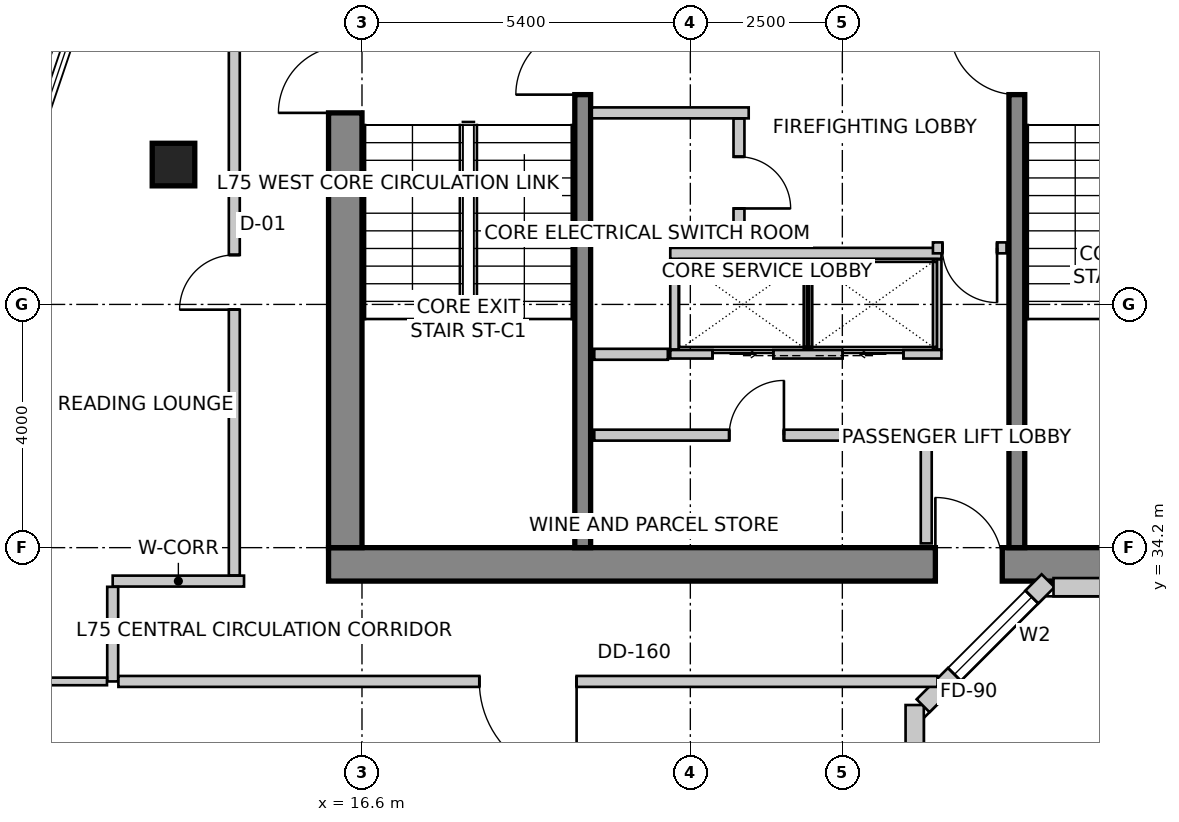
"""IFC4 building model, lengths in metres.
Left out: names, types, materials, properties, quantities, classifications, styles, units other than length and angle.
Written with IfcOpenShell. Run it as: python <this file> out.ifc"""

import sys

from ifc_helpers import new_model, si_unit, direction, frame, frame_2d, origin, origin_2d, place, context, subcontext, project, spatial, rectangle, extrude, source, transform, mapped, element, fill, save


model = new_model("IFC4")
c1 = context("Model", 3, precision=1e-05, world=origin(), true_north=direction((0.0, 1.0)))
c2 = subcontext(c1, "Body", "Model", "MODEL_VIEW")
j1 = project(units=[si_unit("LENGTHUNIT", "METRE"), si_unit("PLANEANGLEUNIT", "RADIAN")], contexts=[c1])
p1 = place(None, origin())
s1 = spatial("IfcSite", under=j1, at=p1, CompositionType="ELEMENT")
p2 = place(p1, origin())
s2 = spatial("IfcBuilding", under=s1, at=p2, CompositionType="ELEMENT")
p3 = place(p2, frame((0.0, 0.0, 292.5)))
s3 = spatial("IfcBuildingStorey", under=s2, at=p3, CompositionType="ELEMENT", Elevation=292.5)
p4 = place(p3, frame((16.05, 33.925, 0.0), z_axis=(0.0, 0.0, 1.0), x_axis=(1.0, 0.0, 0.0)))
e1 = element("IfcWall", 1, at=p4, inside=s3, PredefinedType="SHEAR", context=c2, shape_type="SweptSolid", body=[
    extrude(rectangle(XDim=15.5, YDim=0.55, at=frame_2d((7.75, 0.0))), origin(), (0.0, 0.0, 1.0), 4.0),
])
m1 = source(origin(), c2, "Body", "SweptSolid", [
    extrude(rectangle(XDim=1.1, YDim=2.15, at=frame_2d((0.55, 1.075))), frame((0.0, 0.285, 0.0), z_axis=(0.0, -1.0, 0.0), x_axis=(1.0, 0.0, 0.0)), (0.0, 0.0, 1.0), 0.57),
])
p5 = place(p4, frame((9.98, 0.0, 0.0)))
e2 = element("IfcOpeningElement", 2, at=p5, cuts=e1, PredefinedType="OPENING", context=c2, shape_type="MappedRepresentation", body=[
    mapped(m1, transform((0.0, 0.0, 0.0), scale=1.0)),
])
p6 = place(p3, frame((16.325, 34.2, 0.0), z_axis=(0.0, 0.0, 1.0), x_axis=(0.0, 1.0, 0.0)))
e3 = element("IfcWall", 3, at=p6, inside=s3, PredefinedType="SHEAR", context=c2, shape_type="SweptSolid", body=[
    extrude(rectangle(XDim=11.4, YDim=0.55, at=frame_2d((5.7, 0.0))), origin(), (0.0, 0.0, 1.0), 4.0),
])
p7 = place(p6, frame((7.15, 0.0, 0.0)))
e4 = element("IfcOpeningElement", 4, at=p7, cuts=e3, PredefinedType="OPENING", context=c2, shape_type="MappedRepresentation", body=[
    mapped(m1, transform((0.0, 0.0, 0.0), scale=1.0)),
])
p8 = place(p3, frame((20.23, 34.2, 0.0), z_axis=(0.0, 0.0, 1.0), x_axis=(0.0, 1.0, 0.0)))
e5 = element("IfcWall", 5, at=p8, inside=s3, PredefinedType="SHEAR", context=c2, shape_type="SweptSolid", body=[
    extrude(rectangle(XDim=9.06, YDim=0.26, at=frame_2d((4.53, 0.0))), origin(), (0.0, 0.0, 1.0), 4.0),
])
m2 = source(origin(), c2, "Body", "SweptSolid", [
    extrude(rectangle(XDim=1.1, YDim=2.15, at=frame_2d((0.55, 1.075))), frame((0.0, 0.14, 0.0), z_axis=(0.0, -1.0, 0.0), x_axis=(1.0, 0.0, 0.0)), (0.0, 0.0, 1.0), 0.28),
])
p9 = place(p8, frame((7.45, 0.0, 0.0)))
e6 = element("IfcOpeningElement", 6, at=p9, cuts=e5, PredefinedType="OPENING", context=c2, shape_type="MappedRepresentation", body=[
    mapped(m2, transform((0.0, 0.0, 0.0), scale=1.0)),
])
p10 = place(p3, frame((27.37, 34.2, 0.0), z_axis=(0.0, 0.0, 1.0), x_axis=(0.0, 1.0, 0.0)))
e7 = element("IfcWall", 7, at=p10, inside=s3, PredefinedType="SHEAR", context=c2, shape_type="SweptSolid", body=[
    extrude(rectangle(XDim=9.06, YDim=0.26, at=frame_2d((4.53, 0.0))), origin(), (0.0, 0.0, 1.0), 4.0),
])
p11 = place(p10, frame((7.45, 0.0, 0.0)))
e8 = element("IfcOpeningElement", 8, at=p11, cuts=e7, PredefinedType="OPENING", context=c2, shape_type="MappedRepresentation", body=[
    mapped(m2, transform((0.0, 0.0, 0.0), scale=1.0)),
])
m3 = source(origin(), c2, "Body", "SweptSolid", [
    extrude(rectangle(XDim=0.7, YDim=0.7, at=origin_2d()), origin(), (0.0, 0.0, 1.0), 4.0),
])
p12 = place(p3, frame((13.5, 40.5, 0.0), z_axis=(0.0, 0.0, 1.0), x_axis=(1.0, 0.0, 0.0)))
e9 = element("IfcColumn", 9, at=p12, inside=s3, PredefinedType="COLUMN", context=c2, shape_type="MappedRepresentation", body=[
    mapped(m3, transform((0.0, 0.0, 0.0), scale=1.0)),
])
p13 = place(p3, frame((25.69, 24.957, 0.0), z_axis=(0.0, 0.0, 1.0), x_axis=(0.0, 1.0, 0.0)))
e10 = element("IfcWall", 10, at=p13, inside=s3, PredefinedType="SOLIDWALL", context=c2, shape_type="SweptSolid", body=[
    extrude(rectangle(XDim=6.655, YDim=0.3, at=frame_2d((3.327, 0.0))), origin(), (0.0, 0.0, 1.0), 3.75),
])
m4 = source(origin(), c2, "Body", "SweptSolid", [
    extrude(rectangle(XDim=1.5, YDim=1.8, at=frame_2d((0.75, 0.9))), frame((0.0, 0.16, 0.0), z_axis=(0.0, -1.0, 0.0), x_axis=(1.0, 0.0, 0.0)), (0.0, 0.0, 1.0), 0.32),
])
p14 = place(p13, frame((0.604, 0.0, 0.85)))
e11 = element("IfcOpeningElement", 11, at=p14, cuts=e10, PredefinedType="OPENING", context=c2, shape_type="MappedRepresentation", body=[
    mapped(m4, transform((0.0, 0.0, 0.0), scale=1.0)),
])
m5 = source(origin(), c2, "Body", "SweptSolid", [
    extrude(rectangle(XDim=2.4, YDim=2.2, at=frame_2d((1.2, 1.1))), frame((0.0, 0.16, 0.0), z_axis=(0.0, -1.0, 0.0), x_axis=(1.0, 0.0, 0.0)), (0.0, 0.0, 1.0), 0.32),
])
p15 = place(p13, frame((3.381, 0.0, 0.85)))
e12 = element("IfcOpeningElement", 12, at=p15, cuts=e10, PredefinedType="OPENING", context=c2, shape_type="MappedRepresentation", body=[
    mapped(m5, transform((0.0, 0.0, 0.0), scale=1.0)),
])
p16 = place(p3, frame((25.828, 31.6, 0.0), z_axis=(0.0, 0.0, 1.0), x_axis=(0.707106781187, 0.707106781187, 0.0)))
e13 = element("IfcWall", 13, at=p16, inside=s3, PredefinedType="SOLIDWALL", context=c2, shape_type="SweptSolid", body=[
    extrude(rectangle(XDim=2.907, YDim=0.3, at=frame_2d((1.454, 0.0))), origin(), (0.0, 0.0, 1.0), 3.75),
])
m6 = source(origin(), c2, "Body", "SweptSolid", [
    extrude(rectangle(XDim=1.8, YDim=2.1, at=frame_2d((0.9, 1.05))), frame((0.0, 0.16, 0.0), z_axis=(0.0, -1.0, 0.0), x_axis=(1.0, 0.0, 0.0)), (0.0, 0.0, 1.0), 0.32),
])
p17 = place(p16, frame((0.729, 0.0, 0.85)))
e14 = element("IfcOpeningElement", 14, at=p17, cuts=e13, PredefinedType="OPENING", context=c2, shape_type="MappedRepresentation", body=[
    mapped(m6, transform((0.0, 0.0, 0.0), scale=1.0)),
])
p18 = place(p3, frame((27.973, 33.55, 0.0), z_axis=(0.0, 0.0, 1.0), x_axis=(1.0, 0.0, 0.0)))
e15 = element("IfcWall", 15, at=p18, inside=s3, PredefinedType="SOLIDWALL", context=c2, shape_type="SweptSolid", body=[
    extrude(rectangle(XDim=9.115, YDim=0.3, at=frame_2d((4.558, 0.0))), origin(), (0.0, 0.0, 1.0), 3.75),
])
p19 = place(p18, frame((1.239, 0.0, 0.85)))
e16 = element("IfcOpeningElement", 16, at=p19, cuts=e15, PredefinedType="OPENING", context=c2, shape_type="MappedRepresentation", body=[
    mapped(m5, transform((0.0, 0.0, 0.0), scale=1.0)),
])
m7 = source(origin(), c2, "Body", "SweptSolid", [
    extrude(rectangle(XDim=2.8, YDim=2.4, at=frame_2d((1.4, 1.2))), frame((0.0, 0.16, 0.0), z_axis=(0.0, -1.0, 0.0), x_axis=(1.0, 0.0, 0.0)), (0.0, 0.0, 1.0), 0.32),
])
p20 = place(p18, frame((5.276, 0.0, 0.85)))
e17 = element("IfcOpeningElement", 17, at=p20, cuts=e15, PredefinedType="OPENING", context=c2, shape_type="MappedRepresentation", body=[
    mapped(m7, transform((0.0, 0.0, 0.0), scale=1.0)),
])
p21 = place(p3, frame((21.67, 37.38, 0.0), z_axis=(0.0, 0.0, 1.0), x_axis=(1.0, 0.0, 0.0)))
e18 = element("IfcWall", 18, at=p21, inside=s3, PredefinedType="SOLIDWALL", context=c2, shape_type="SweptSolid", body=[
    extrude(rectangle(XDim=4.46, YDim=0.14, at=frame_2d((2.23, 0.0))), origin(), (0.0, 0.0, 1.0), 3.75),
])
m8 = source(origin(), c2, "Body", "SweptSolid", [
    extrude(rectangle(XDim=1.0, YDim=2.15, at=frame_2d((0.5, 1.075))), frame((0.0, 0.08, 0.0), z_axis=(0.0, -1.0, 0.0), x_axis=(1.0, 0.0, 0.0)), (0.0, 0.0, 1.0), 0.16),
])
p22 = place(p21, frame((0.695, 0.0, 0.0)))
e19 = element("IfcOpeningElement", 19, at=p22, cuts=e18, PredefinedType="OPENING", context=c2, shape_type="MappedRepresentation", body=[
    mapped(m8, transform((0.0, 0.0, 0.0), scale=1.0)),
])
p23 = place(p21, frame((2.835, 0.0, 0.0)))
e20 = element("IfcOpeningElement", 20, at=p23, cuts=e18, PredefinedType="OPENING", context=c2, shape_type="MappedRepresentation", body=[
    mapped(m8, transform((0.0, 0.0, 0.0), scale=1.0)),
])
p24 = place(p3, frame((21.67, 39.04, 0.0), z_axis=(0.0, 0.0, 1.0), x_axis=(1.0, 0.0, 0.0)))
e21 = element("IfcWall", 21, at=p24, inside=s3, PredefinedType="SOLIDWALL", context=c2, shape_type="SweptSolid", body=[
    extrude(rectangle(XDim=4.46, YDim=0.18, at=frame_2d((2.23, 0.0))), origin(), (0.0, 0.0, 1.0), 3.75),
])
for number, where, z_axis, x_axis in (
    (22, (26.06, 37.46, 0.0), (0.0, 0.0, 1.0), (0.0, 1.0, 0.0)),
    (23, (21.74, 37.46, 0.0), (0.0, 0.0, 1.0), (0.0, 1.0, 0.0)),
    (24, (23.935, 37.46, 0.0), (0.0, 0.0, 1.0), (0.0, 1.0, 0.0)),
):
    element("IfcWall", number, at=place(p3, frame(where, z_axis=z_axis, x_axis=x_axis)), inside=s3, PredefinedType="SOLIDWALL", context=c2, shape_type="SweptSolid", body=[
        extrude(rectangle(XDim=1.48, YDim=0.14, at=frame_2d((0.74, 0.0))), origin(), (0.0, 0.0, 1.0), 3.75),
    ])
p25 = place(p3, frame((22.96, 41.35, 0.0), z_axis=(0.0, 0.0, 1.0), x_axis=(-1.0, 0.0, 0.0)))
e25 = element("IfcWall", 25, at=p25, inside=s3, PredefinedType="PARTITIONING", context=c2, shape_type="SweptSolid", body=[
    extrude(rectangle(XDim=2.58, YDim=0.18, at=frame_2d((1.29, 0.0))), origin(), (0.0, 0.0, 1.0), 3.75),
])
p26 = place(p3, frame((22.8, 41.256, 0.0), z_axis=(0.0, 0.0, 1.0), x_axis=(0.0, -1.0, 0.0)))
e26 = element("IfcWall", 26, at=p26, inside=s3, PredefinedType="PARTITIONING", context=c2, shape_type="SweptSolid", body=[
    extrude(rectangle(XDim=2.106, YDim=0.18, at=frame_2d((1.053, 0.0))), origin(), (0.0, 0.0, 1.0), 3.75),
])
m9 = source(origin(), c2, "Body", "SweptSolid", [
    extrude(rectangle(XDim=0.85, YDim=2.15, at=frame_2d((0.425, 1.075))), frame((0.0, 0.1, 0.0), z_axis=(0.0, -1.0, 0.0), x_axis=(1.0, 0.0, 0.0)), (0.0, 0.0, 1.0), 0.2),
])
p27 = place(p26, frame((0.628, 0.0, 0.0)))
e27 = element("IfcOpeningElement", 27, at=p27, cuts=e26, PredefinedType="OPENING", context=c2, shape_type="MappedRepresentation", body=[
    mapped(m9, transform((0.0, 0.0, 0.0), scale=1.0)),
])
p28 = place(p3, frame((21.63, 37.38, 0.0), z_axis=(0.0, 0.0, 1.0), x_axis=(-1.0, 0.0, 0.0)))
e28 = element("IfcWall", 28, at=p28, inside=s3, PredefinedType="PARTITIONING", context=c2, shape_type="SweptSolid", body=[
    extrude(rectangle(XDim=1.21, YDim=0.18, at=frame_2d((0.605, 0.0))), origin(), (0.0, 0.0, 1.0), 3.75),
])
p29 = place(p3, frame((27.2, 39.13, 0.0), z_axis=(0.0, 0.0, 1.0), x_axis=(-1.0, 0.0, 0.0)))
e29 = element("IfcWall", 29, at=p29, inside=s3, PredefinedType="PARTITIONING", context=c2, shape_type="SweptSolid", body=[
    extrude(rectangle(XDim=1.21, YDim=0.18, at=frame_2d((0.605, 0.0))), origin(), (0.0, 0.0, 1.0), 3.75),
])
m10 = source(origin(), c2, "Body", "SweptSolid", [
    extrude(rectangle(XDim=0.9, YDim=2.15, at=frame_2d((0.45, 1.075))), frame((0.0, 0.1, 0.0), z_axis=(0.0, -1.0, 0.0), x_axis=(1.0, 0.0, 0.0)), (0.0, 0.0, 1.0), 0.2),
])
p30 = place(p29, frame((0.155, 0.0, 0.0)))
e30 = element("IfcOpeningElement", 30, at=p30, cuts=e29, PredefinedType="OPENING", context=c2, shape_type="MappedRepresentation", body=[
    mapped(m10, transform((0.0, 0.0, 0.0), scale=1.0)),
])
p31 = place(p3, frame((20.42, 36.05, 0.0), z_axis=(0.0, 0.0, 1.0), x_axis=(1.0, 0.0, 0.0)))
e31 = element("IfcWall", 31, at=p31, inside=s3, PredefinedType="PARTITIONING", context=c2, shape_type="SweptSolid", body=[
    extrude(rectangle(XDim=5.46, YDim=0.18, at=frame_2d((2.73, 0.0))), origin(), (0.0, 0.0, 1.0), 3.75),
])
p32 = place(p31, frame((2.219, 0.0, 0.0)))
e32 = element("IfcOpeningElement", 32, at=p32, cuts=e31, PredefinedType="OPENING", context=c2, shape_type="MappedRepresentation", body=[
    mapped(m10, transform((0.0, 0.0, 0.0), scale=1.0)),
])
p33 = place(p3, frame((25.88, 35.956, 0.0), z_axis=(0.0, 0.0, 1.0), x_axis=(0.0, -1.0, 0.0)))
e33 = element("IfcWall", 33, at=p33, inside=s3, PredefinedType="PARTITIONING", context=c2, shape_type="SweptSolid", body=[
    extrude(rectangle(XDim=1.686, YDim=0.18, at=frame_2d((0.843, 0.0))), origin(), (0.0, 0.0, 1.0), 3.042),
])
p34 = place(p3, frame((12.5, 33.65, 0.0), z_axis=(0.0, 0.0, 1.0), x_axis=(1.0, 0.0, 0.0)))
e34 = element("IfcWall", 34, at=p34, inside=s3, PredefinedType="PARTITIONING", context=c2, shape_type="SweptSolid", body=[
    extrude(rectangle(XDim=2.16, YDim=0.18, at=frame_2d((1.08, 0.0))), origin(), (0.0, 0.0, 1.0), 3.75),
])
p35 = place(p3, frame((12.5, 32.0, 0.0), z_axis=(0.0, 0.0, 1.0), x_axis=(0.0, 1.0, 0.0)))
e35 = element("IfcWall", 35, at=p35, inside=s3, PredefinedType="PARTITIONING", context=c2, shape_type="SweptSolid", body=[
    extrude(rectangle(XDim=1.556, YDim=0.18, at=frame_2d((0.778, 0.0))), origin(), (0.0, 0.0, 1.0), 3.335),
])
p36 = place(p3, frame((26.065, 32.0, 0.0), z_axis=(0.0, 0.0, 1.0), x_axis=(-1.0, 0.0, 0.0)))
e36 = element("IfcWall", 36, at=p36, inside=s3, PredefinedType="PARTITIONING", context=c2, shape_type="SweptSolid", body=[
    extrude(rectangle(XDim=13.471, YDim=0.18, at=frame_2d((6.736, 0.0))), origin(), (0.0, 0.0, 1.0), 3.335),
])
m11 = source(origin(), c2, "Body", "SweptSolid", [
    extrude(rectangle(XDim=1.6, YDim=2.15, at=frame_2d((0.8, 1.075))), frame((0.0, 0.1, 0.0), z_axis=(0.0, -1.0, 0.0), x_axis=(1.0, 0.0, 0.0)), (0.0, 0.0, 1.0), 0.2),
])
p37 = place(p36, frame((5.936, 0.0, 0.0)))
e37 = element("IfcOpeningElement", 37, at=p37, cuts=e36, PredefinedType="OPENING", context=c2, shape_type="MappedRepresentation", body=[
    mapped(m11, transform((0.0, 0.0, 0.0), scale=1.0)),
])
p38 = place(p3, frame((14.5, 33.744, 0.0), z_axis=(0.0, 0.0, 1.0), x_axis=(0.0, 1.0, 0.0)))
e38 = element("IfcWall", 38, at=p38, inside=s3, PredefinedType="PARTITIONING", context=c2, shape_type="SweptSolid", body=[
    extrude(rectangle(XDim=12.406, YDim=0.18, at=frame_2d((6.203, 0.0))), origin(), (0.0, 0.0, 1.0), 3.75),
])
p39 = place(p38, frame((4.37, 0.0, 0.0)))
e39 = element("IfcOpeningElement", 39, at=p39, cuts=e38, PredefinedType="OPENING", context=c2, shape_type="MappedRepresentation", body=[
    mapped(m10, transform((0.0, 0.0, 0.0), scale=1.0)),
])
p40 = place(p3, frame((12.406, 32.0, 0.0), z_axis=(0.0, 0.0, 1.0), x_axis=(-1.0, 0.0, 0.0)))
e40 = element("IfcWall", 40, at=p40, inside=s3, PredefinedType="PARTITIONING", context=c2, shape_type="SweptSolid", body=[
    extrude(rectangle(XDim=4.126, YDim=0.125, at=frame_2d((2.063, 0.0))), origin(), (0.0, 0.0, 1.0), 3.042),
])
m12 = source(origin(), c2, "Body", "SweptSolid", [
    extrude(rectangle(XDim=1.8, YDim=2.1, at=frame_2d((0.9, 1.05))), frame((0.0, -0.015, 0.0), z_axis=(0.0, -1.0, 0.0), x_axis=(1.0, 0.0, 0.0)), (0.0, 0.0, 1.0), 0.06),
])
p41 = place(p17, origin())
e41 = element("IfcWindow", 41, at=p41, inside=s3, PartitioningType="SINGLE_PANEL", PredefinedType="WINDOW", context=c2, shape_type="MappedRepresentation", body=[
    mapped(m12, transform((0.0, 0.0, 0.0), scale=1.0)),
])
fill(e14, e41)
m13 = source(origin(), c2, "Body", "SweptSolid", [
    extrude(rectangle(XDim=1.0, YDim=2.15, at=frame_2d((0.5, 1.075))), frame((0.0, 0.025, 0.0), z_axis=(0.0, -1.0, 0.0), x_axis=(1.0, 0.0, 0.0)), (0.0, 0.0, 1.0), 0.05),
])
p42 = place(p22, origin())
e42 = element("IfcDoor", 42, at=p42, inside=s3, OperationType="SLIDING_TO_RIGHT", PredefinedType="DOOR", context=c2, shape_type="MappedRepresentation", body=[
    mapped(m13, transform((0.0, 0.0, 0.0), scale=1.0)),
])
fill(e19, e42)
p43 = place(p23, origin())
e43 = element("IfcDoor", 43, at=p43, inside=s3, OperationType="SLIDING_TO_LEFT", PredefinedType="DOOR", context=c2, shape_type="MappedRepresentation", body=[
    mapped(m13, transform((0.0, 0.0, 0.0), scale=1.0)),
])
fill(e20, e43)
m14 = source(origin(), c2, "Body", "SweptSolid", [
    extrude(rectangle(XDim=1.1, YDim=2.15, at=frame_2d((0.55, 1.075))), frame((0.0, 0.025, 0.0), z_axis=(0.0, -1.0, 0.0), x_axis=(1.0, 0.0, 0.0)), (0.0, 0.0, 1.0), 0.05),
])
p44 = place(p9, origin())
e44 = element("IfcDoor", 44, at=p44, inside=s3, OperationType="SINGLE_SWING_LEFT", PredefinedType="DOOR", context=c2, shape_type="MappedRepresentation", body=[
    mapped(m14, transform((0.0, 0.0, 0.0), scale=1.0)),
])
fill(e6, e44)
p45 = place(p11, origin())
e45 = element("IfcDoor", 45, at=p45, inside=s3, OperationType="SINGLE_SWING_RIGHT", PredefinedType="DOOR", context=c2, shape_type="MappedRepresentation", body=[
    mapped(m14, transform((0.0, 0.0, 0.0), scale=1.0)),
])
fill(e8, e45)
p46 = place(p7, origin())
e46 = element("IfcDoor", 46, at=p46, inside=s3, OperationType="SINGLE_SWING_LEFT", PredefinedType="DOOR", context=c2, shape_type="MappedRepresentation", body=[
    mapped(m14, transform((0.0, 0.0, 0.0), scale=1.0)),
])
fill(e4, e46)
p47 = place(p5, origin())
e47 = element("IfcDoor", 47, at=p47, inside=s3, OperationType="SINGLE_SWING_LEFT", PredefinedType="DOOR", context=c2, shape_type="MappedRepresentation", body=[
    mapped(m14, transform((0.0, 0.0, 0.0), scale=1.0)),
])
fill(e2, e47)
m15 = source(origin(), c2, "Body", "SweptSolid", [
    extrude(rectangle(XDim=0.85, YDim=2.15, at=frame_2d((0.425, 1.075))), frame((0.0, 0.025, 0.0), z_axis=(0.0, -1.0, 0.0), x_axis=(1.0, 0.0, 0.0)), (0.0, 0.0, 1.0), 0.05),
])
p48 = place(p27, origin())
e48 = element("IfcDoor", 48, at=p48, inside=s3, OperationType="SINGLE_SWING_RIGHT", PredefinedType="DOOR", context=c2, shape_type="MappedRepresentation", body=[
    mapped(m15, transform((0.0, 0.0, 0.0), scale=1.0)),
])
fill(e27, e48)
m16 = source(origin(), c2, "Body", "SweptSolid", [
    extrude(rectangle(XDim=0.9, YDim=2.15, at=frame_2d((0.45, 1.075))), frame((0.0, 0.025, 0.0), z_axis=(0.0, -1.0, 0.0), x_axis=(1.0, 0.0, 0.0)), (0.0, 0.0, 1.0), 0.05),
])
p49 = place(p30, origin())
e49 = element("IfcDoor", 49, at=p49, inside=s3, OperationType="SINGLE_SWING_LEFT", PredefinedType="DOOR", context=c2, shape_type="MappedRepresentation", body=[
    mapped(m16, transform((0.0, 0.0, 0.0), scale=1.0)),
])
fill(e30, e49)
p50 = place(p32, origin())
e50 = element("IfcDoor", 50, at=p50, inside=s3, OperationType="SINGLE_SWING_RIGHT", PredefinedType="DOOR", context=c2, shape_type="MappedRepresentation", body=[
    mapped(m16, transform((0.0, 0.0, 0.0), scale=1.0)),
])
fill(e32, e50)
m17 = source(origin(), c2, "Body", "SweptSolid", [
    extrude(rectangle(XDim=0.9, YDim=2.15, at=frame_2d((0.45, 1.075))), frame((0.0, 0.025, 0.0), z_axis=(0.0, -1.0, 0.0), x_axis=(1.0, 0.0, 0.0)), (0.0, 0.0, 1.0), 0.05),
])
p51 = place(p39, origin())
e51 = element("IfcDoor", 51, at=p51, inside=s3, OperationType="SINGLE_SWING_LEFT", PredefinedType="DOOR", context=c2, shape_type="MappedRepresentation", body=[
    mapped(m17, transform((0.0, 0.0, 0.0), scale=1.0)),
])
fill(e39, e51)
m18 = source(origin(), c2, "Body", "SweptSolid", [
    extrude(rectangle(XDim=1.6, YDim=2.15, at=frame_2d((0.8, 1.075))), frame((0.0, 0.025, 0.0), z_axis=(0.0, -1.0, 0.0), x_axis=(1.0, 0.0, 0.0)), (0.0, 0.0, 1.0), 0.05),
])
p52 = place(p37, origin())
e52 = element("IfcDoor", 52, at=p52, inside=s3, OperationType="SINGLE_SWING_LEFT", PredefinedType="DOOR", context=c2, shape_type="MappedRepresentation", body=[
    mapped(m18, transform((0.0, 0.0, 0.0), scale=1.0)),
])
fill(e37, e52)
save(model, sys.argv[1])
